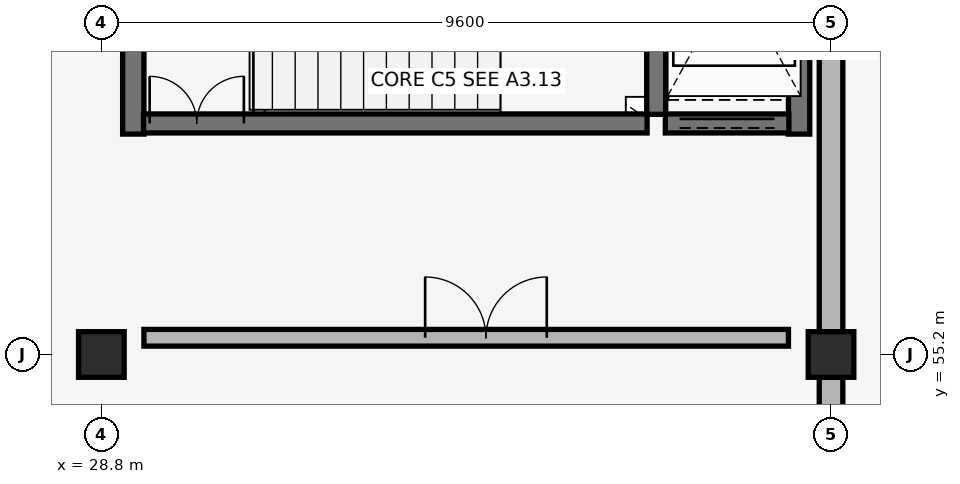
"""IFC4 building model, lengths in metres.
Left out: names, types, materials, properties, quantities, classifications, styles, units other than length and angle.
Written with IfcOpenShell. Run it as: python <this file> out.ifc"""

import sys

from ifc_helpers import new_model, si_unit, direction, frame, frame_2d, origin, origin_2d, place, context, subcontext, project, spatial, rectangle, extrude, element, fill, save


model = new_model("IFC4")
c1 = context("Model", 3, precision=1e-05, world=origin(), true_north=direction((0.0, 1.0)))
c2 = subcontext(c1, "Body", "Model", "MODEL_VIEW")
j1 = project(units=[si_unit("LENGTHUNIT", "METRE"), si_unit("PLANEANGLEUNIT", "RADIAN")], contexts=[c1])
p1 = place(None, origin())
s1 = spatial("IfcSite", under=j1, at=p1, CompositionType="ELEMENT")
p2 = place(p1, origin())
s2 = spatial("IfcBuilding", under=s1, at=p2, CompositionType="ELEMENT")
p3 = place(p2, frame((0.0, 0.0, 8.5)))
s3 = spatial("IfcBuildingStorey", under=s2, at=p3, CompositionType="ELEMENT", Elevation=8.5)
for number, where, z_axis, x_axis in (
    (1, (28.8, 55.2, 0.0), (0.0, 0.0, 1.0), (1.0, 0.0, 0.0)),
    (2, (38.4, 55.2, 0.0), (0.0, 0.0, 1.0), (1.0, 0.0, 0.0)),
):
    element("IfcColumn", number, at=place(p3, frame(where, z_axis=z_axis, x_axis=x_axis)), inside=s3, PredefinedType="COLUMN", context=c2, shape_type="SweptSolid", body=[
        extrude(rectangle(XDim=0.6, YDim=0.6, at=origin_2d()), origin(), (0.0, 0.0, 1.0), 4.08),
    ])
p4 = place(p3, frame((38.4, 48.3, 0.0), z_axis=(0.0, 0.0, 1.0), x_axis=(0.0, 1.0, 0.0)))
e3 = element("IfcWall", 3, at=p4, inside=s3, PredefinedType="SOLIDWALL", context=c2, shape_type="SweptSolid", body=[
    extrude(rectangle(XDim=6.6, YDim=0.31, at=frame_2d((3.3, 0.0))), origin(), (0.0, 0.0, 1.0), 3.06),
])
p5 = place(p4, frame((2.5, 0.0, 0.0)))
e4 = element("IfcOpeningElement", 4, at=p5, cuts=e3, PredefinedType="OPENING", context=c2, shape_type="SweptSolid", body=[
    extrude(rectangle(XDim=1.6, YDim=2.15, at=frame_2d((0.8, 1.075))), frame((0.0, 0.165, 0.0), z_axis=(0.0, -1.0, 0.0), x_axis=(1.0, 0.0, 0.0)), (0.0, 0.0, 1.0), 0.33),
])
p6 = place(p3, frame((38.4, 55.5, 0.0), z_axis=(0.0, 0.0, 1.0), x_axis=(0.0, 1.0, 0.0)))
e5 = element("IfcWall", 5, at=p6, inside=s3, PredefinedType="SOLIDWALL", context=c2, shape_type="SweptSolid", body=[
    extrude(rectangle(XDim=6.6, YDim=0.31, at=frame_2d((3.3, 0.0))), origin(), (0.0, 0.0, 1.0), 3.06),
])
for number, where, z_axis, x_axis in (
    (6, (29.22, 58.1, 0.0), (0.0, 0.0, 1.0), (0.0, 1.0, 0.0)),
    (7, (37.98, 58.1, 0.0), (0.0, 0.0, 1.0), (0.0, 1.0, 0.0)),
):
    element("IfcWall", number, at=place(p3, frame(where, z_axis=z_axis, x_axis=x_axis)), inside=s3, PredefinedType="SHEAR", context=c2, shape_type="SweptSolid", body=[
        extrude(rectangle(XDim=4.08, YDim=0.28, at=frame_2d((2.04, 0.0))), origin(), (0.0, 0.0, 1.0), 3.78),
    ])
p7 = place(p3, frame((36.1, 58.36, 0.0), z_axis=(0.0, 0.0, 1.0), x_axis=(0.0, 1.0, 0.0)))
e8 = element("IfcWall", 8, at=p7, inside=s3, PredefinedType="SHEAR", context=c2, shape_type="SweptSolid", body=[
    extrude(rectangle(XDim=3.54, YDim=0.25, at=frame_2d((1.77, 0.0))), origin(), (0.0, 0.0, 1.0), 3.78),
])
p8 = place(p3, frame((29.355, 58.24, 0.0), z_axis=(0.0, 0.0, 1.0), x_axis=(1.0, 0.0, 0.0)))
e9 = element("IfcWall", 9, at=p8, inside=s3, PredefinedType="SHEAR", context=c2, shape_type="SweptSolid", body=[
    extrude(rectangle(XDim=6.625, YDim=0.25, at=frame_2d((3.312, 0.0))), origin(), (0.0, 0.0, 1.0), 3.78),
])
p9 = place(p8, frame((0.08, 0.0, 0.0)))
e10 = element("IfcOpeningElement", 10, at=p9, cuts=e9, PredefinedType="OPENING", context=c2, shape_type="SweptSolid", body=[
    extrude(rectangle(XDim=1.24, YDim=2.15, at=frame_2d((0.62, 1.075))), frame((0.0, 0.135, 0.0), z_axis=(0.0, -1.0, 0.0), x_axis=(1.0, 0.0, 0.0)), (0.0, 0.0, 1.0), 0.27),
])
p10 = place(p3, frame((29.36, 55.42, 0.0), z_axis=(0.0, 0.0, 1.0), x_axis=(1.0, 0.0, 0.0)))
e11 = element("IfcWall", 11, at=p10, inside=s3, PredefinedType="PARTITIONING", context=c2, shape_type="SweptSolid", body=[
    extrude(rectangle(XDim=8.48, YDim=0.22, at=frame_2d((4.24, 0.0))), origin(), (0.0, 0.0, 1.0), 3.11),
])
p11 = place(p10, frame((3.7, 0.0, 0.0)))
e12 = element("IfcOpeningElement", 12, at=p11, cuts=e11, PredefinedType="OPENING", context=c2, shape_type="SweptSolid", body=[
    extrude(rectangle(XDim=1.6, YDim=2.2, at=frame_2d((0.8, 1.1))), frame((0.0, 0.12, 0.0), z_axis=(0.0, -1.0, 0.0), x_axis=(1.0, 0.0, 0.0)), (0.0, 0.0, 1.0), 0.24),
])
p12 = place(p3, frame((36.22, 58.24, 0.0), z_axis=(0.0, 0.0, 1.0), x_axis=(1.0, 0.0, 0.0)))
e13 = element("IfcWall", 13, at=p12, inside=s3, PredefinedType="SHEAR", context=c2, shape_type="SweptSolid", body=[
    extrude(rectangle(XDim=1.625, YDim=0.25, at=frame_2d((0.812, 0.0))), origin(), (0.0, 0.0, 1.0), 3.78),
])
p13 = place(p12, frame((0.188, 0.0, 0.0)))
e14 = element("IfcOpeningElement", 14, at=p13, cuts=e13, PredefinedType="OPENING", context=c2, shape_type="SweptSolid", body=[
    extrude(rectangle(XDim=1.25, YDim=2.15, at=frame_2d((0.625, 1.075))), frame((0.0, 0.135, 0.0), z_axis=(0.0, -1.0, 0.0), x_axis=(1.0, 0.0, 0.0)), (0.0, 0.0, 1.0), 0.27),
])
p14 = place(p9, origin())
e15 = element("IfcDoor", 15, at=p14, inside=s3, OperationType="DOUBLE_DOOR_SINGLE_SWING", PredefinedType="DOOR", context=c2, shape_type="SweptSolid", body=[
    extrude(rectangle(XDim=1.24, YDim=2.15, at=frame_2d((0.62, 1.075))), frame((0.0, 0.025, 0.0), z_axis=(0.0, -1.0, 0.0), x_axis=(1.0, 0.0, 0.0)), (0.0, 0.0, 1.0), 0.05),
])
fill(e10, e15)
p15 = place(p11, origin())
e16 = element("IfcDoor", 16, at=p15, inside=s3, OperationType="DOUBLE_DOOR_SINGLE_SWING", PredefinedType="DOOR", context=c2, shape_type="SweptSolid", body=[
    extrude(rectangle(XDim=1.6, YDim=2.2, at=frame_2d((0.8, 1.1))), frame((0.0, 0.025, 0.0), z_axis=(0.0, -1.0, 0.0), x_axis=(1.0, 0.0, 0.0)), (0.0, 0.0, 1.0), 0.05),
])
fill(e12, e16)
p16 = place(p13, origin())
e17 = element("IfcDoor", 17, at=p16, inside=s3, OperationType="DOUBLE_DOOR_SLIDING", PredefinedType="DOOR", context=c2, shape_type="SweptSolid", body=[
    extrude(rectangle(XDim=1.25, YDim=2.15, at=frame_2d((0.625, 1.075))), frame((0.0, 0.025, 0.0), z_axis=(0.0, -1.0, 0.0), x_axis=(1.0, 0.0, 0.0)), (0.0, 0.0, 1.0), 0.05),
])
fill(e14, e17)
save(model, sys.argv[1])
